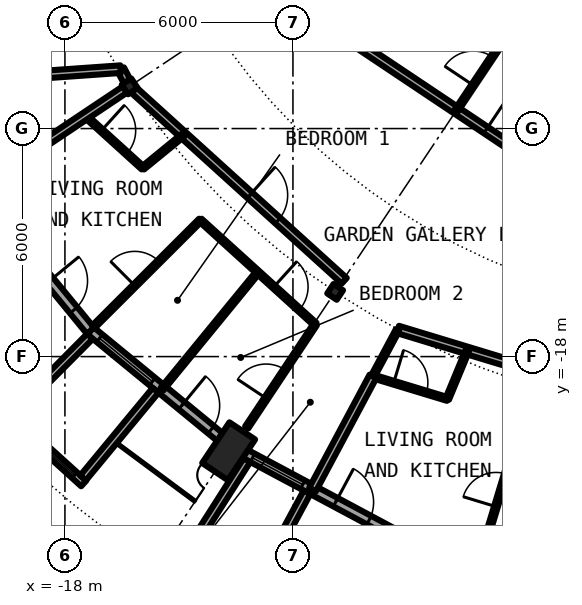
"""IFC4 building model, lengths in metres.
Left out: names, types, materials, properties, quantities, classifications, styles, units other than length and angle.
Written with IfcOpenShell. Run it as: python <this file> out.ifc"""

import sys

from ifc_helpers import new_model, si_unit, direction, frame, frame_2d, origin, origin_2d, place, context, subcontext, project, spatial, rectangle, circle, hollow_circle, i_section, extrude, element, fill, save


model = new_model("IFC4")
c1 = context("Model", 3, precision=1e-05, world=origin(), true_north=direction((0.0, 1.0)))
c2 = subcontext(c1, "Body", "Model", "MODEL_VIEW")
j1 = project(units=[si_unit("LENGTHUNIT", "METRE"), si_unit("PLANEANGLEUNIT", "RADIAN")], contexts=[c1])
p1 = place(None, origin())
s1 = spatial("IfcSite", under=j1, at=p1, CompositionType="ELEMENT")
p2 = place(p1, origin())
s2 = spatial("IfcBuilding", under=s1, at=p2, CompositionType="ELEMENT")
p3 = place(p2, frame((0.0, 0.0, 243.2)))
s3 = spatial("IfcBuildingStorey", under=s2, at=p3, CompositionType="ELEMENT", Elevation=243.2)
p4 = place(p3, frame((-14.05, -21.027, 0.242), z_axis=(0.231750495433, 0.346875102267, 0.908828570905), x_axis=(-0.831496228988, 0.555530396269, 0.0)))
e1 = element("IfcColumn", 1, at=p4, inside=s3, PredefinedType="COLUMN", context=c2, shape_type="SweptSolid", body=[
    extrude(hollow_circle(Radius=0.406, WallThickness=0.03, at=origin_2d()), origin(), (0.0, 0.0, 1.0), 3.09),
])
for number, where, z_axis, x_axis in (
    (2, (-16.297, -10.889, 0.0), (0.0, 0.0, 1.0), (-0.831, -0.556, 0.0)),
    (3, (-10.889, -16.297, 0.0), (0.0, 0.0, 1.0), (-0.556, -0.831, 0.0)),
):
    element("IfcColumn", number, at=place(p3, frame(where, z_axis=z_axis, x_axis=x_axis)), inside=s3, PredefinedType="COLUMN", context=c2, shape_type="SweptSolid", body=[
        extrude(i_section(OverallWidth=0.3, OverallDepth=0.3, WebThickness=0.011, FlangeThickness=0.019, FilletRadius=0.027, at=origin_2d()), origin(), (0.0, 0.0, 1.0), 3.05),
    ])
p5 = place(p3, frame((-20.371, -13.611, 0.0), z_axis=(0.0, 0.0, 1.0), x_axis=(0.634396836208, -0.773007538262, 0.0)))
e4 = element("IfcWall", 4, at=p5, inside=s3, PredefinedType="SOLIDWALL", context=c2, shape_type="SweptSolid", body=[
    extrude(rectangle(XDim=4.803, YDim=0.25, at=frame_2d((2.402, 0.0))), origin(), (0.0, 0.0, 1.0), 2.7),
])
p6 = place(p5, frame((0.62, 0.0, 0.3)))
e5 = element("IfcOpeningElement", 5, at=p6, cuts=e4, PredefinedType="OPENING", context=c2, shape_type="SweptSolid", body=[
    extrude(rectangle(XDim=1.5, YDim=2.1, at=frame_2d((0.75, 1.05))), frame((0.0, 0.135, 0.0), z_axis=(0.0, -1.0, 0.0), x_axis=(1.0, 0.0, 0.0)), (0.0, 0.0, 1.0), 0.27),
])
p7 = place(p5, frame((3.099, 0.0, 0.0)))
e6 = element("IfcOpeningElement", 6, at=p7, cuts=e4, PredefinedType="OPENING", context=c2, shape_type="SweptSolid", body=[
    extrude(rectangle(XDim=1.0, YDim=2.2, at=frame_2d((0.5, 1.1))), frame((0.0, 0.135, 0.0), z_axis=(0.0, -1.0, 0.0), x_axis=(1.0, 0.0, 0.0)), (0.0, 0.0, 1.0), 0.27),
])
p8 = place(p3, frame((-17.324, -17.324, 0.0), z_axis=(0.0, 0.0, 1.0), x_axis=(0.773007538262, -0.634396836208, 0.0)))
e7 = element("IfcWall", 7, at=p8, inside=s3, PredefinedType="SOLIDWALL", context=c2, shape_type="SweptSolid", body=[
    extrude(rectangle(XDim=4.803, YDim=0.25, at=frame_2d((2.402, 0.0))), origin(), (0.0, 0.0, 1.0), 2.7),
])
p9 = place(p8, frame((0.304, 0.0, 0.3)))
e8 = element("IfcOpeningElement", 8, at=p9, cuts=e7, PredefinedType="OPENING", context=c2, shape_type="SweptSolid", body=[
    extrude(rectangle(XDim=1.8, YDim=2.1, at=frame_2d((0.9, 1.05))), frame((0.0, 0.135, 0.0), z_axis=(0.0, -1.0, 0.0), x_axis=(1.0, 0.0, 0.0)), (0.0, 0.0, 1.0), 0.27),
])
p10 = place(p8, frame((3.099, 0.0, 0.0)))
e9 = element("IfcOpeningElement", 9, at=p10, cuts=e7, PredefinedType="OPENING", context=c2, shape_type="SweptSolid", body=[
    extrude(rectangle(XDim=1.0, YDim=2.2, at=frame_2d((0.5, 1.1))), frame((0.0, 0.135, 0.0), z_axis=(0.0, -1.0, 0.0), x_axis=(1.0, 0.0, 0.0)), (0.0, 0.0, 1.0), 0.27),
])
p11 = place(p3, frame((-19.52, -19.513, -0.03), z_axis=(0.0, 0.0, 1.0), x_axis=(0.741016284298, -0.671487056022, 0.0)))
e10 = element("IfcWall", 10, at=p11, inside=s3, PredefinedType="SOLIDWALL", context=c2, shape_type="SweptSolid", body=[
    extrude(rectangle(XDim=2.718, YDim=0.2, at=frame_2d((1.359, 0.0))), origin(), (0.0, 0.0, 1.0), 2.73),
])
p12 = place(p11, frame((0.319, 0.0, 0.33)))
e11 = element("IfcOpeningElement", 11, at=p12, cuts=e10, PredefinedType="OPENING", context=c2, shape_type="SweptSolid", body=[
    extrude(circle(Radius=1.04, at=frame_2d((1.04, 1.04))), frame((0.0, 0.11, 0.0), z_axis=(0.0, -1.0, 0.0), x_axis=(1.0, 0.0, 0.0)), (0.0, 0.0, 1.0), 0.22),
])
p13 = place(p3, frame((-17.344, -17.47, -0.03), z_axis=(0.0, 0.0, 1.0), x_axis=(-0.704306055012, -0.709896457854, 0.0)))
e12 = element("IfcWall", 12, at=p13, inside=s3, PredefinedType="SOLIDWALL", context=c2, shape_type="SweptSolid", body=[
    extrude(rectangle(XDim=2.882, YDim=0.2, at=frame_2d((1.441, 0.0))), origin(), (0.0, 0.0, 1.0), 2.73),
])
p14 = place(p3, frame((-15.615, -18.888, -0.03), z_axis=(0.0, 0.0, 1.0), x_axis=(-0.637452521862, -0.770489638069, 0.0)))
e13 = element("IfcWall", 13, at=p14, inside=s3, PredefinedType="SOLIDWALL", context=c2, shape_type="SweptSolid", body=[
    extrude(rectangle(XDim=2.993, YDim=0.2, at=frame_2d((1.497, 0.0))), origin(), (0.0, 0.0, 1.0), 2.73),
])
p15 = place(p3, frame((-13.611, -20.371, 0.0), z_axis=(0.0, 0.0, 1.0), x_axis=(0.881903608701, -0.471429766731, 0.0)))
e14 = element("IfcWall", 14, at=p15, inside=s3, PredefinedType="SOLIDWALL", context=c2, shape_type="SweptSolid", body=[
    extrude(rectangle(XDim=4.802, YDim=0.25, at=frame_2d((2.401, 0.0))), origin(), (0.0, 0.0, 1.0), 2.7),
])
p16 = place(p15, frame((0.62, 0.0, 0.3)))
e15 = element("IfcOpeningElement", 15, at=p16, cuts=e14, PredefinedType="OPENING", context=c2, shape_type="SweptSolid", body=[
    extrude(rectangle(XDim=1.5, YDim=2.1, at=frame_2d((0.75, 1.05))), frame((0.0, 0.135, 0.0), z_axis=(0.0, -1.0, 0.0), x_axis=(1.0, 0.0, 0.0)), (0.0, 0.0, 1.0), 0.27),
])
p17 = place(p15, frame((3.099, 0.0, 0.0)))
e16 = element("IfcOpeningElement", 16, at=p17, cuts=e14, PredefinedType="OPENING", context=c2, shape_type="SweptSolid", body=[
    extrude(rectangle(XDim=1.0, YDim=2.2, at=frame_2d((0.5, 1.1))), frame((0.0, 0.135, 0.0), z_axis=(0.0, -1.0, 0.0), x_axis=(1.0, 0.0, 0.0)), (0.0, 0.0, 1.0), 0.27),
])
p18 = place(p3, frame((-13.211, -20.727, -0.03), z_axis=(0.0, 0.0, 1.0), x_axis=(-0.537551395407, -0.843230986917, 0.0)))
e17 = element("IfcWall", 17, at=p18, inside=s3, PredefinedType="SOLIDWALL", context=c2, shape_type="SweptSolid", body=[
    extrude(rectangle(XDim=2.921, YDim=0.2, at=frame_2d((1.46, 0.0))), origin(), (0.0, 0.0, 1.0), 2.73),
])
p19 = place(p3, frame((-11.631, -21.572, -0.03), z_axis=(0.0, 0.0, 1.0), x_axis=(-0.474649669009, -0.880174807473, 0.0)))
e18 = element("IfcWall", 18, at=p19, inside=s3, PredefinedType="SOLIDWALL", context=c2, shape_type="SweptSolid", body=[
    extrude(rectangle(XDim=2.991, YDim=0.2, at=frame_2d((1.496, 0.0))), origin(), (0.0, 0.0, 1.0), 2.73),
])
p20 = place(p3, frame((-9.893, -18.523, 0.0), z_axis=(0.0, 0.0, 1.0), x_axis=(0.957015380529, -0.2900371725, 0.0)))
e19 = element("IfcWall", 19, at=p20, inside=s3, PredefinedType="PARTITIONING", context=c2, shape_type="SweptSolid", body=[
    extrude(rectangle(XDim=2.048, YDim=0.1, at=frame_2d((1.024, 0.0))), origin(), (0.0, 0.0, 1.0), 2.7),
])
p21 = place(p20, frame((0.568, 0.0, 0.0)))
e20 = element("IfcOpeningElement", 20, at=p21, cuts=e19, PredefinedType="OPENING", context=c2, shape_type="SweptSolid", body=[
    extrude(rectangle(XDim=0.9, YDim=2.3, at=frame_2d((0.45, 1.15))), frame((0.0, 0.06, 0.0), z_axis=(0.0, -1.0, 0.0), x_axis=(1.0, 0.0, 0.0)), (0.0, 0.0, 1.0), 0.12),
])
p22 = place(p3, frame((-17.461, -11.667, 0.0), z_axis=(0.0, 0.0, 1.0), x_axis=(0.740773018627, -0.671755412984, 0.0)))
e21 = element("IfcWall", 21, at=p22, inside=s3, PredefinedType="PARTITIONING", context=c2, shape_type="SweptSolid", body=[
    extrude(rectangle(XDim=2.041, YDim=0.1, at=frame_2d((1.021, 0.0))), origin(), (0.0, 0.0, 1.0), 2.7),
])
p23 = place(p22, frame((0.571, 0.0, 0.0)))
e22 = element("IfcOpeningElement", 22, at=p23, cuts=e21, PredefinedType="OPENING", context=c2, shape_type="SweptSolid", body=[
    extrude(rectangle(XDim=0.9, YDim=2.3, at=frame_2d((0.45, 1.15))), frame((0.0, 0.06, 0.0), z_axis=(0.0, -1.0, 0.0), x_axis=(1.0, 0.0, 0.0)), (0.0, 0.0, 1.0), 0.12),
])
p24 = place(p3, frame((-14.437, -14.409, 0.0), z_axis=(0.0, 0.0, 1.0), x_axis=(0.740802780294, -0.671722592078, 0.0)))
e23 = element("IfcWall", 23, at=p24, inside=s3, PredefinedType="PARTITIONING", context=c2, shape_type="SweptSolid", body=[
    extrude(rectangle(XDim=4.082, YDim=0.1, at=frame_2d((2.041, 0.0))), origin(), (0.0, 0.0, 1.0), 2.7),
])
p25 = place(p24, frame((2.612, 0.0, 0.0)))
e24 = element("IfcOpeningElement", 24, at=p25, cuts=e23, PredefinedType="OPENING", context=c2, shape_type="SweptSolid", body=[
    extrude(rectangle(XDim=0.9, YDim=2.3, at=frame_2d((0.45, 1.15))), frame((0.0, 0.06, 0.0), z_axis=(0.0, -1.0, 0.0), x_axis=(1.0, 0.0, 0.0)), (0.0, 0.0, 1.0), 0.12),
])
p26 = place(p3, frame((-16.535, -10.437, 0.0), z_axis=(0.0, 0.0, 1.0), x_axis=(0.465802239822, -0.884888848035, 0.0)))
e25 = element("IfcWall", 25, at=p26, inside=s3, PredefinedType="PARTITIONING", context=c2, shape_type="SweptSolid", body=[
    extrude(rectangle(XDim=0.361, YDim=0.2, at=frame_2d((0.18, 0.0))), origin(), (0.0, 0.0, 1.0), 2.7),
])
p27 = place(p3, frame((-9.239, -17.286, 0.0), z_axis=(0.0, 0.0, 1.0), x_axis=(0.956929842753, -0.290319265721, 0.0)))
e26 = element("IfcWall", 26, at=p27, inside=s3, PredefinedType="PARTITIONING", context=c2, shape_type="SweptSolid", body=[
    extrude(rectangle(XDim=7.647, YDim=0.2, at=frame_2d((3.824, 0.0))), origin(), (0.0, 0.0, 1.0), 2.45),
])
p28 = place(p27, frame((4.161, 0.0, 0.0)))
e27 = element("IfcOpeningElement", 27, at=p28, cuts=e26, PredefinedType="OPENING", context=c2, shape_type="SweptSolid", body=[
    extrude(rectangle(XDim=1.0, YDim=2.3, at=frame_2d((0.5, 1.15))), frame((0.0, 0.11, 0.0), z_axis=(0.0, -1.0, 0.0), x_axis=(1.0, 0.0, 0.0)), (0.0, 0.0, 1.0), 0.22),
])
p29 = place(p3, frame((-16.182, -10.993, 0.0), z_axis=(0.0, 0.0, 1.0), x_axis=(0.740939653983, -0.671571611339, 0.0)))
e28 = element("IfcWall", 28, at=p29, inside=s3, PredefinedType="PARTITIONING", context=c2, shape_type="SweptSolid", body=[
    extrude(rectangle(XDim=7.465, YDim=0.2, at=frame_2d((3.732, 0.0))), origin(), (0.0, 0.0, 1.0), 2.45),
])
p30 = place(p29, frame((4.107, 0.0, 0.0)))
e29 = element("IfcOpeningElement", 29, at=p30, cuts=e28, PredefinedType="OPENING", context=c2, shape_type="SweptSolid", body=[
    extrude(rectangle(XDim=1.0, YDim=2.3, at=frame_2d((0.5, 1.15))), frame((0.0, 0.11, 0.0), z_axis=(0.0, -1.0, 0.0), x_axis=(1.0, 0.0, 0.0)), (0.0, 0.0, 1.0), 0.22),
])
p31 = place(p3, frame((-11.279, -9.131, 0.0), z_axis=(0.0, 0.0, 1.0), x_axis=(0.831522779461, -0.555490654501, 0.0)))
e30 = element("IfcWall", 30, at=p31, inside=s3, PredefinedType="PARTITIONING", context=c2, shape_type="SweptSolid", body=[
    extrude(rectangle(XDim=10.047, YDim=0.2, at=frame_2d((5.023, 0.0))), origin(), (0.0, 0.0, 1.0), 2.7),
])
p32 = place(p31, frame((5.239, 0.0, 0.0)))
e31 = element("IfcOpeningElement", 31, at=p32, cuts=e30, PredefinedType="OPENING", context=c2, shape_type="SweptSolid", body=[
    extrude(rectangle(XDim=1.0, YDim=2.3, at=frame_2d((0.5, 1.15))), frame((0.0, 0.11, 0.0), z_axis=(0.0, -1.0, 0.0), x_axis=(1.0, 0.0, 0.0)), (0.0, 0.0, 1.0), 0.22),
])
p33 = place(p3, frame((-8.601, -7.92, 0.0), z_axis=(0.0, 0.0, 1.0), x_axis=(0.83141852367, -0.555646684953, 0.0)))
e32 = element("IfcWall", 32, at=p33, inside=s3, PredefinedType="PARTITIONING", context=c2, shape_type="SweptSolid", body=[
    extrude(rectangle(XDim=3.927, YDim=0.1, at=frame_2d((1.964, 0.0))), origin(), (0.0, 0.0, 1.0), 2.7),
])
p34 = place(p3, frame((-21.675, -10.8, 0.0), z_axis=(0.0, 0.0, 1.0), x_axis=(0.997515141784, 0.070452408845, 0.0)))
e33 = element("IfcWall", 33, at=p34, inside=s3, PredefinedType="PARTITIONING", context=c2, shape_type="SweptSolid", body=[
    extrude(rectangle(XDim=5.153, YDim=0.2, at=frame_2d((2.576, 0.0))), origin(), (0.0, 0.0, 1.0), 2.7),
])
p35 = place(p34, frame((2.076, 0.0, 0.0)))
e34 = element("IfcOpeningElement", 34, at=p35, cuts=e33, PredefinedType="OPENING", context=c2, shape_type="SweptSolid", body=[
    extrude(rectangle(XDim=1.0, YDim=2.3, at=frame_2d((0.5, 1.15))), frame((0.0, 0.11, 0.0), z_axis=(0.0, -1.0, 0.0), x_axis=(1.0, 0.0, 0.0)), (0.0, 0.0, 1.0), 0.22),
])
p36 = place(p3, frame((-19.838, -13.255, 0.0), z_axis=(0.0, 0.0, 1.0), x_axis=(0.831400632185, 0.55567345519, 0.0)))
e35 = element("IfcWall", 35, at=p36, inside=s3, PredefinedType="PARTITIONING", context=c2, shape_type="SweptSolid", body=[
    extrude(rectangle(XDim=4.108, YDim=0.2, at=frame_2d((2.054, 0.0))), origin(), (0.0, 0.0, 1.0), 2.7),
])
p37 = place(p3, frame((-17.252, -17.219, 0.0), z_axis=(0.0, 0.0, 1.0), x_axis=(0.707720109647, 0.706492920277, 0.0)))
e36 = element("IfcWall", 36, at=p37, inside=s3, PredefinedType="PARTITIONING", context=c2, shape_type="SweptSolid", body=[
    extrude(rectangle(XDim=3.979, YDim=0.1, at=frame_2d((1.989, 0.0))), origin(), (0.0, 0.0, 1.0), 2.7),
])
p38 = place(p37, frame((1.539, 0.0, 0.0)))
e37 = element("IfcOpeningElement", 37, at=p38, cuts=e36, PredefinedType="OPENING", context=c2, shape_type="SweptSolid", body=[
    extrude(rectangle(XDim=0.9, YDim=2.3, at=frame_2d((0.45, 1.15))), frame((0.0, 0.06, 0.0), z_axis=(0.0, -1.0, 0.0), x_axis=(1.0, 0.0, 0.0)), (0.0, 0.0, 1.0), 0.12),
])
p39 = place(p3, frame((-15.949, -13.038, 0.0), z_axis=(0.0, 0.0, 1.0), x_axis=(0.774099733189, 0.633063664315, 0.0)))
e38 = element("IfcWall", 38, at=p39, inside=s3, PredefinedType="PARTITIONING", context=c2, shape_type="SweptSolid", body=[
    extrude(rectangle(XDim=1.375, YDim=0.1, at=frame_2d((0.687, 0.0))), origin(), (0.0, 0.0, 1.0), 2.7),
])
p40 = place(p3, frame((-15.445, -18.857, 0.0), z_axis=(0.0, 0.0, 1.0), x_axis=(0.633648720881, 0.77362090104, 0.0)))
e39 = element("IfcWall", 39, at=p40, inside=s3, PredefinedType="PARTITIONING", context=c2, shape_type="SweptSolid", body=[
    extrude(rectangle(XDim=3.979, YDim=0.1, at=frame_2d((1.989, 0.0))), origin(), (0.0, 0.0, 1.0), 2.7),
])
p41 = place(p3, frame((-13.217, -19.864, 0.0), z_axis=(0.0, 0.0, 1.0), x_axis=(0.553749157203, 0.832683535862, 0.0)))
e40 = element("IfcWall", 40, at=p41, inside=s3, PredefinedType="PARTITIONING", context=c2, shape_type="SweptSolid", body=[
    extrude(rectangle(XDim=3.26, YDim=0.1, at=frame_2d((1.63, 0.0))), origin(), (0.0, 0.0, 1.0), 2.7),
])
p42 = place(p41, frame((0.922, 0.0, 0.0)))
e41 = element("IfcOpeningElement", 41, at=p42, cuts=e40, PredefinedType="OPENING", context=c2, shape_type="SweptSolid", body=[
    extrude(rectangle(XDim=0.9, YDim=2.3, at=frame_2d((0.45, 1.15))), frame((0.0, 0.06, 0.0), z_axis=(0.0, -1.0, 0.0), x_axis=(1.0, 0.0, 0.0)), (0.0, 0.0, 1.0), 0.12),
])
p43 = place(p3, frame((-11.485, -21.499, 0.0), z_axis=(0.0, 0.0, 1.0), x_axis=(0.471125037246, 0.882066436999, 0.0)))
e42 = element("IfcWall", 42, at=p43, inside=s3, PredefinedType="PARTITIONING", context=c2, shape_type="SweptSolid", body=[
    extrude(rectangle(XDim=3.375, YDim=0.2, at=frame_2d((1.688, 0.0))), origin(), (0.0, 0.0, 1.0), 2.7),
])
p44 = place(p3, frame((-7.939, -19.115, 0.0), z_axis=(0.0, 0.0, 1.0), x_axis=(0.383534338408, 0.923526616434, 0.0)))
e43 = element("IfcWall", 43, at=p44, inside=s3, PredefinedType="PARTITIONING", context=c2, shape_type="SweptSolid", body=[
    extrude(rectangle(XDim=1.379, YDim=0.1, at=frame_2d((0.69, 0.0))), origin(), (0.0, 0.0, 1.0), 2.7),
])
p45 = place(p3, frame((-7.699, -11.523, 0.0), z_axis=(0.0, 0.0, 1.0), x_axis=(0.555625883274, 0.831432425297, 0.0)))
e44 = element("IfcWall", 44, at=p45, inside=s3, PredefinedType="PARTITIONING", context=c2, shape_type="SweptSolid", body=[
    extrude(rectangle(XDim=2.494, YDim=0.1, at=frame_2d((1.247, 0.0))), origin(), (0.0, 0.0, 1.0), 2.7),
])
p46 = place(p45, frame((0.797, 0.0, 0.0)))
e45 = element("IfcOpeningElement", 45, at=p46, cuts=e44, PredefinedType="OPENING", context=c2, shape_type="SweptSolid", body=[
    extrude(rectangle(XDim=0.9, YDim=2.3, at=frame_2d((0.45, 1.15))), frame((0.0, 0.06, 0.0), z_axis=(0.0, -1.0, 0.0), x_axis=(1.0, 0.0, 0.0)), (0.0, 0.0, 1.0), 0.12),
])
p47 = place(p3, frame((-7.076, -23.325, 0.0), z_axis=(0.0, 0.0, 1.0), x_axis=(0.290364312451, 0.956916175041, 0.0)))
e46 = element("IfcWall", 46, at=p47, inside=s3, PredefinedType="PARTITIONING", context=c2, shape_type="SweptSolid", body=[
    extrude(rectangle(XDim=3.778, YDim=0.1, at=frame_2d((1.889, 0.0))), origin(), (0.0, 0.0, 1.0), 2.7),
])
p48 = place(p47, frame((1.439, 0.0, 0.0)))
e47 = element("IfcOpeningElement", 47, at=p48, cuts=e46, PredefinedType="OPENING", context=c2, shape_type="SweptSolid", body=[
    extrude(rectangle(XDim=0.9, YDim=2.3, at=frame_2d((0.45, 1.15))), frame((0.0, 0.06, 0.0), z_axis=(0.0, -1.0, 0.0), x_axis=(1.0, 0.0, 0.0)), (0.0, 0.0, 1.0), 0.12),
])
p49 = place(p3, frame((-9.889, -18.502, 0.0), z_axis=(0.0, 0.0, 1.0), x_axis=(0.471138605408, 0.882059189904, 0.0)))
e48 = element("IfcWall", 48, at=p49, inside=s3, PredefinedType="PARTITIONING", context=c2, shape_type="SweptSolid", body=[
    extrude(rectangle(XDim=1.358, YDim=0.1, at=frame_2d((0.679, 0.0))), origin(), (0.0, 0.0, 1.0), 2.7),
])
p50 = place(p7, origin())
e49 = element("IfcDoor", 49, at=p50, inside=s3, OperationType="SINGLE_SWING_LEFT", PredefinedType="DOOR", context=c2, shape_type="SweptSolid", body=[
    extrude(rectangle(XDim=1.0, YDim=2.2, at=frame_2d((0.5, 1.1))), frame((0.0, 0.025, 0.0), z_axis=(0.0, -1.0, 0.0), x_axis=(1.0, 0.0, 0.0)), (0.0, 0.0, 1.0), 0.05),
])
fill(e6, e49)
p51 = place(p9, origin())
e50 = element("IfcWindow", 50, at=p51, inside=s3, PartitioningType="SINGLE_PANEL", PredefinedType="WINDOW", context=c2, shape_type="SweptSolid", body=[
    extrude(rectangle(XDim=1.8, YDim=2.1, at=frame_2d((0.9, 1.05))), frame((0.0, 0.03, 0.0), z_axis=(0.0, -1.0, 0.0), x_axis=(1.0, 0.0, 0.0)), (0.0, 0.0, 1.0), 0.06),
])
fill(e8, e50)
p52 = place(p12, origin())
e51 = element("IfcWindow", 51, at=p52, inside=s3, PartitioningType="SINGLE_PANEL", PredefinedType="WINDOW", context=c2, shape_type="SweptSolid", body=[
    extrude(circle(Radius=1.04, at=frame_2d((1.04, 1.04))), frame((0.0, 0.03, 0.0), z_axis=(0.0, -1.0, 0.0), x_axis=(1.0, 0.0, 0.0)), (0.0, 0.0, 1.0), 0.06),
])
fill(e11, e51)
p53 = place(p10, origin())
e52 = element("IfcDoor", 52, at=p53, inside=s3, OperationType="SINGLE_SWING_LEFT", PredefinedType="DOOR", context=c2, shape_type="SweptSolid", body=[
    extrude(rectangle(XDim=1.0, YDim=2.2, at=frame_2d((0.5, 1.1))), frame((0.0, 0.025, 0.0), z_axis=(0.0, -1.0, 0.0), x_axis=(1.0, 0.0, 0.0)), (0.0, 0.0, 1.0), 0.05),
])
fill(e9, e52)
p54 = place(p16, origin())
e53 = element("IfcWindow", 53, at=p54, inside=s3, PartitioningType="SINGLE_PANEL", PredefinedType="WINDOW", context=c2, shape_type="SweptSolid", body=[
    extrude(rectangle(XDim=1.5, YDim=2.1, at=frame_2d((0.75, 1.05))), frame((0.0, 0.03, 0.0), z_axis=(0.0, -1.0, 0.0), x_axis=(1.0, 0.0, 0.0)), (0.0, 0.0, 1.0), 0.06),
])
fill(e15, e53)
p55 = place(p17, origin())
e54 = element("IfcDoor", 54, at=p55, inside=s3, OperationType="SINGLE_SWING_LEFT", PredefinedType="DOOR", context=c2, shape_type="SweptSolid", body=[
    extrude(rectangle(XDim=1.0, YDim=2.2, at=frame_2d((0.5, 1.1))), frame((0.0, 0.025, 0.0), z_axis=(0.0, -1.0, 0.0), x_axis=(1.0, 0.0, 0.0)), (0.0, 0.0, 1.0), 0.05),
])
fill(e16, e54)
p56 = place(p30, origin())
e55 = element("IfcDoor", 55, at=p56, inside=s3, OperationType="SINGLE_SWING_RIGHT", PredefinedType="DOOR", context=c2, shape_type="SweptSolid", body=[
    extrude(rectangle(XDim=1.0, YDim=2.3, at=frame_2d((0.5, 1.15))), frame((0.0, 0.025, 0.0), z_axis=(0.0, -1.0, 0.0), x_axis=(1.0, 0.0, 0.0)), (0.0, 0.0, 1.0), 0.05),
])
fill(e29, e55)
p57 = place(p23, origin())
e56 = element("IfcDoor", 56, at=p57, inside=s3, OperationType="SINGLE_SWING_LEFT", PredefinedType="DOOR", context=c2, shape_type="SweptSolid", body=[
    extrude(rectangle(XDim=0.9, YDim=2.3, at=frame_2d((0.45, 1.15))), frame((0.0, 0.025, 0.0), z_axis=(0.0, -1.0, 0.0), x_axis=(1.0, 0.0, 0.0)), (0.0, 0.0, 1.0), 0.05),
])
fill(e22, e56)
p58 = place(p38, origin())
e57 = element("IfcDoor", 57, at=p58, inside=s3, OperationType="SINGLE_SWING_RIGHT", PredefinedType="DOOR", context=c2, shape_type="SweptSolid", body=[
    extrude(rectangle(XDim=0.9, YDim=2.3, at=frame_2d((0.45, 1.15))), frame((0.0, 0.025, 0.0), z_axis=(0.0, -1.0, 0.0), x_axis=(1.0, 0.0, 0.0)), (0.0, 0.0, 1.0), 0.05),
])
fill(e37, e57)
p59 = place(p25, origin())
e58 = element("IfcDoor", 58, at=p59, inside=s3, OperationType="SINGLE_SWING_RIGHT", PredefinedType="DOOR", context=c2, shape_type="SweptSolid", body=[
    extrude(rectangle(XDim=0.9, YDim=2.3, at=frame_2d((0.45, 1.15))), frame((0.0, 0.025, 0.0), z_axis=(0.0, -1.0, 0.0), x_axis=(1.0, 0.0, 0.0)), (0.0, 0.0, 1.0), 0.05),
])
fill(e24, e58)
p60 = place(p42, origin())
e59 = element("IfcDoor", 59, at=p60, inside=s3, OperationType="SINGLE_SWING_LEFT", PredefinedType="DOOR", context=c2, shape_type="SweptSolid", body=[
    extrude(rectangle(XDim=0.9, YDim=2.3, at=frame_2d((0.45, 1.15))), frame((0.0, 0.025, 0.0), z_axis=(0.0, -1.0, 0.0), x_axis=(1.0, 0.0, 0.0)), (0.0, 0.0, 1.0), 0.05),
])
fill(e41, e59)
p61 = place(p21, origin())
e60 = element("IfcDoor", 60, at=p61, inside=s3, OperationType="SINGLE_SWING_LEFT", PredefinedType="DOOR", context=c2, shape_type="SweptSolid", body=[
    extrude(rectangle(XDim=0.9, YDim=2.3, at=frame_2d((0.45, 1.15))), frame((0.0, 0.025, 0.0), z_axis=(0.0, -1.0, 0.0), x_axis=(1.0, 0.0, 0.0)), (0.0, 0.0, 1.0), 0.05),
])
fill(e20, e60)
p62 = place(p48, origin())
e61 = element("IfcDoor", 61, at=p62, inside=s3, OperationType="SINGLE_SWING_RIGHT", PredefinedType="DOOR", context=c2, shape_type="SweptSolid", body=[
    extrude(rectangle(XDim=0.9, YDim=2.3, at=frame_2d((0.45, 1.15))), frame((0.0, 0.025, 0.0), z_axis=(0.0, -1.0, 0.0), x_axis=(1.0, 0.0, 0.0)), (0.0, 0.0, 1.0), 0.05),
])
fill(e47, e61)
p63 = place(p32, origin())
e62 = element("IfcDoor", 62, at=p63, inside=s3, OperationType="SINGLE_SWING_RIGHT", PredefinedType="DOOR", context=c2, shape_type="SweptSolid", body=[
    extrude(rectangle(XDim=1.0, YDim=2.3, at=frame_2d((0.5, 1.15))), frame((0.0, 0.025, 0.0), z_axis=(0.0, -1.0, 0.0), x_axis=(1.0, 0.0, 0.0)), (0.0, 0.0, 1.0), 0.05),
])
fill(e31, e62)
p64 = place(p46, origin())
e63 = element("IfcDoor", 63, at=p64, inside=s3, OperationType="SINGLE_SWING_LEFT", PredefinedType="DOOR", context=c2, shape_type="SweptSolid", body=[
    extrude(rectangle(XDim=0.9, YDim=2.3, at=frame_2d((0.45, 1.15))), frame((0.0, 0.025, 0.0), z_axis=(0.0, -1.0, 0.0), x_axis=(1.0, 0.0, 0.0)), (0.0, 0.0, 1.0), 0.05),
])
fill(e45, e63)
save(model, sys.argv[1])
